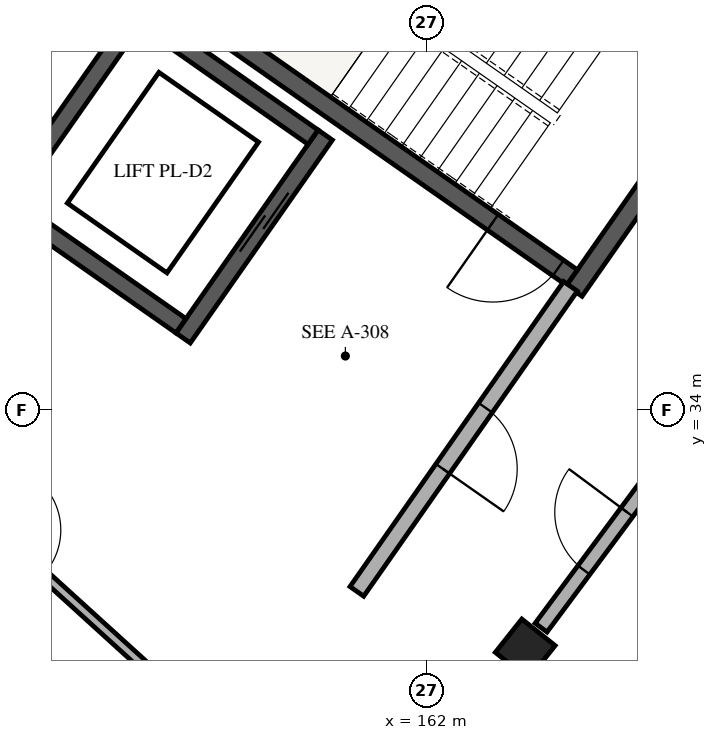
"""IFC4 building model, lengths in metres.
Left out: names, types, materials, properties, quantities, classifications, styles, units other than length and angle.
Written with IfcOpenShell. Run it as: python <this file> out.ifc"""

import sys

from ifc_helpers import new_model, si_unit, direction, frame, frame_2d, origin, origin_2d, place, context, subcontext, project, spatial, rectangle, extrude, element, fill, save


model = new_model("IFC4")
c1 = context("Model", 3, precision=1e-05, world=origin(), true_north=direction((0.0, 1.0)))
c2 = subcontext(c1, "Body", "Model", "MODEL_VIEW")
j1 = project(units=[si_unit("LENGTHUNIT", "METRE"), si_unit("PLANEANGLEUNIT", "RADIAN")], contexts=[c1])
p1 = place(None, origin())
s1 = spatial("IfcSite", under=j1, at=p1, CompositionType="ELEMENT")
p2 = place(p1, origin())
s2 = spatial("IfcBuilding", under=s1, at=p2, CompositionType="ELEMENT")
p3 = place(p2, frame((0.0, 0.0, 18.92)))
s3 = spatial("IfcBuildingStorey", under=s2, at=p3, CompositionType="ELEMENT", Elevation=18.92)
p4 = place(p3, frame((165.733, 38.336, 0.0), z_axis=(0.0, 0.0, 1.0), x_axis=(-0.819153711596, 0.573574055182, 0.0)))
e1 = element("IfcWall", 1, at=p4, inside=s3, PredefinedType="SHEAR", context=c2, shape_type="SweptSolid", body=[
    extrude(rectangle(XDim=6.6, YDim=0.25, at=frame_2d((3.3, 0.0))), origin(), (0.0, 0.0, 1.0), 3.11),
])
p5 = place(p3, frame((165.907, 38.366, 0.0), z_axis=(0.0, 0.0, 1.0), x_axis=(-0.573582112484, -0.819148069789, 0.0)))
e2 = element("IfcWall", 2, at=p5, inside=s3, PredefinedType="SHEAR", context=c2, shape_type="SweptSolid", body=[
    extrude(rectangle(XDim=3.42, YDim=0.25, at=frame_2d((1.71, 0.0))), origin(), (0.0, 0.0, 1.0), 3.11),
])
p6 = place(p3, frame((163.914, 35.739, 0.0), z_axis=(0.0, 0.0, 1.0), x_axis=(-0.819153711596, 0.573574055182, 0.0)))
e3 = element("IfcWall", 3, at=p6, inside=s3, PredefinedType="SHEAR", context=c2, shape_type="SweptSolid", body=[
    extrude(rectangle(XDim=6.6, YDim=0.25, at=frame_2d((3.3, 0.0))), origin(), (0.0, 0.0, 1.0), 3.11),
])
p7 = place(p6, frame((0.22, 0.0, 0.0)))
e4 = element("IfcOpeningElement", 4, at=p7, cuts=e3, PredefinedType="OPENING", context=c2, shape_type="SweptSolid", body=[
    extrude(rectangle(XDim=1.05, YDim=2.15, at=frame_2d((0.525, 1.075))), frame((0.0, 0.135, 0.0), z_axis=(0.0, -1.0, 0.0), x_axis=(1.0, 0.0, 0.0)), (0.0, 0.0, 1.0), 0.27),
])
p8 = place(p3, frame((160.668, 37.615, 0.0), z_axis=(0.0, 0.0, 1.0), x_axis=(-0.573582966431, -0.819147471839, 0.0)))
e5 = element("IfcWall", 5, at=p8, inside=s3, PredefinedType="SHEAR", context=c2, shape_type="SweptSolid", body=[
    extrude(rectangle(XDim=3.26, YDim=0.23, at=frame_2d((1.63, 0.0))), origin(), (0.0, 0.0, 1.0), 3.11),
])
p9 = place(p8, frame((0.9, 0.0, 0.0)))
e6 = element("IfcOpeningElement", 6, at=p9, cuts=e5, PredefinedType="OPENING", context=c2, shape_type="SweptSolid", body=[
    extrude(rectangle(XDim=1.0, YDim=2.15, at=frame_2d((0.5, 1.075))), frame((0.0, 0.125, 0.0), z_axis=(0.0, -1.0, 0.0), x_axis=(1.0, 0.0, 0.0)), (0.0, 0.0, 1.0), 0.25),
])
p10 = place(p3, frame((158.268, 39.296, 0.0), z_axis=(0.0, 0.0, 1.0), x_axis=(-0.573582966431, -0.819147471839, 0.0)))
e7 = element("IfcWall", 7, at=p10, inside=s3, PredefinedType="SHEAR", context=c2, shape_type="SweptSolid", body=[
    extrude(rectangle(XDim=3.26, YDim=0.23, at=frame_2d((1.63, 0.0))), origin(), (0.0, 0.0, 1.0), 3.11),
])
p11 = place(p3, frame((160.508, 37.587, 0.0), z_axis=(0.0, 0.0, 1.0), x_axis=(-0.819189439894, 0.573523026186, 0.0)))
e8 = element("IfcWall", 8, at=p11, inside=s3, PredefinedType="SHEAR", context=c2, shape_type="SweptSolid", body=[
    extrude(rectangle(XDim=2.7, YDim=0.23, at=frame_2d((1.35, 0.0))), origin(), (0.0, 0.0, 1.0), 3.11),
])
p12 = place(p3, frame((158.77, 35.105, 0.0), z_axis=(0.0, 0.0, 1.0), x_axis=(-0.819117209968, 0.573626181702, 0.0)))
e9 = element("IfcWall", 9, at=p12, inside=s3, PredefinedType="SHEAR", context=c2, shape_type="SweptSolid", body=[
    extrude(rectangle(XDim=2.7, YDim=0.23, at=frame_2d((1.35, 0.0))), origin(), (0.0, 0.0, 1.0), 3.11),
])
p13 = place(p3, frame((163.3, 30.853, 0.0), z_axis=(0.0, 0.0, 1.0), x_axis=(0.782608156852, -0.622514636638, 0.0)))
e10 = element("IfcColumn", 10, at=p13, inside=s3, PredefinedType="COLUMN", context=c2, shape_type="SweptSolid", body=[
    extrude(rectangle(XDim=0.56, YDim=0.56, at=origin_2d()), origin(), (0.0, 0.0, 1.0), 3.11),
])
p14 = place(p3, frame((163.895, 35.624, 0.0), z_axis=(0.0, 0.0, 1.0), x_axis=(-0.573572687386, -0.819154669329, 0.0)))
e11 = element("IfcWall", 11, at=p14, inside=s3, PredefinedType="PARTITIONING", context=c2, shape_type="SweptSolid", body=[
    extrude(rectangle(XDim=4.9, YDim=0.22, at=frame_2d((2.45, 0.0))), origin(), (0.0, 0.0, 1.0), 2.34),
])
p15 = place(p14, frame((1.95, 0.0, 0.0)))
e12 = element("IfcOpeningElement", 12, at=p15, cuts=e11, PredefinedType="OPENING", context=c2, shape_type="SweptSolid", body=[
    extrude(rectangle(XDim=0.98, YDim=2.14, at=frame_2d((0.49, 1.07))), frame((0.0, 0.12, 0.0), z_axis=(0.0, -1.0, 0.0), x_axis=(1.0, 0.0, 0.0)), (0.0, 0.0, 1.0), 0.24),
])
p16 = place(p3, frame((154.199, 34.344, 0.0), z_axis=(0.0, 0.0, 1.0), x_axis=(0.74023124711, -0.672352363573, 0.0)))
e13 = element("IfcWall", 13, at=p16, inside=s3, PredefinedType="PARTITIONING", context=c2, shape_type="SweptSolid", body=[
    extrude(rectangle(XDim=6.6, YDim=0.125, at=frame_2d((3.3, 0.0))), origin(), (0.0, 0.0, 1.0), 2.37),
])
p17 = place(p16, frame((2.865, 0.0, 0.0)))
e14 = element("IfcOpeningElement", 14, at=p17, cuts=e13, PredefinedType="OPENING", context=c2, shape_type="SweptSolid", body=[
    extrude(rectangle(XDim=0.87, YDim=2.08, at=frame_2d((0.435, 1.04))), frame((0.0, 0.073, 0.0), z_axis=(0.0, -1.0, 0.0), x_axis=(1.0, 0.0, 0.0)), (0.0, 0.0, 1.0), 0.145),
])
p18 = place(p3, frame((163.509, 31.134, 0.0), z_axis=(0.0, 0.0, 1.0), x_axis=(0.596552136601, 0.802574325727, 0.0)))
e15 = element("IfcWall", 15, at=p18, inside=s3, PredefinedType="PARTITIONING", context=c2, shape_type="SweptSolid", body=[
    extrude(rectangle(XDim=2.837, YDim=0.195, at=frame_2d((1.418, 0.0))), origin(), (0.0, 0.0, 1.0), 2.37),
])
p19 = place(p18, frame((0.944, 0.0, 0.0)))
e16 = element("IfcOpeningElement", 16, at=p19, cuts=e15, PredefinedType="OPENING", context=c2, shape_type="SweptSolid", body=[
    extrude(rectangle(XDim=0.95, YDim=2.13, at=frame_2d((0.475, 1.065))), frame((0.0, 0.107, 0.0), z_axis=(0.0, -1.0, 0.0), x_axis=(1.0, 0.0, 0.0)), (0.0, 0.0, 1.0), 0.215),
])
p20 = place(p7, origin())
e17 = element("IfcDoor", 17, at=p20, inside=s3, OperationType="SINGLE_SWING_RIGHT", PredefinedType="DOOR", context=c2, shape_type="SweptSolid", body=[
    extrude(rectangle(XDim=1.05, YDim=2.15, at=frame_2d((0.525, 1.075))), frame((0.0, 0.025, 0.0), z_axis=(0.0, -1.0, 0.0), x_axis=(1.0, 0.0, 0.0)), (0.0, 0.0, 1.0), 0.05),
])
fill(e4, e17)
p21 = place(p9, origin())
e18 = element("IfcDoor", 18, at=p21, inside=s3, OperationType="DOUBLE_DOOR_SLIDING", PredefinedType="DOOR", context=c2, shape_type="SweptSolid", body=[
    extrude(rectangle(XDim=1.0, YDim=2.15, at=frame_2d((0.5, 1.075))), frame((0.0, 0.025, 0.0), z_axis=(0.0, -1.0, 0.0), x_axis=(1.0, 0.0, 0.0)), (0.0, 0.0, 1.0), 0.05),
])
fill(e6, e18)
p22 = place(p15, origin())
e19 = element("IfcDoor", 19, at=p22, inside=s3, OperationType="SINGLE_SWING_RIGHT", PredefinedType="DOOR", context=c2, shape_type="SweptSolid", body=[
    extrude(rectangle(XDim=0.98, YDim=2.14, at=frame_2d((0.49, 1.07))), frame((0.0, 0.025, 0.0), z_axis=(0.0, -1.0, 0.0), x_axis=(1.0, 0.0, 0.0)), (0.0, 0.0, 1.0), 0.05),
])
fill(e12, e19)
p23 = place(p19, origin())
e20 = element("IfcDoor", 20, at=p23, inside=s3, OperationType="SINGLE_SWING_RIGHT", PredefinedType="DOOR", context=c2, shape_type="SweptSolid", body=[
    extrude(rectangle(XDim=0.95, YDim=2.13, at=frame_2d((0.475, 1.065))), frame((0.0, 0.025, 0.0), z_axis=(0.0, -1.0, 0.0), x_axis=(1.0, 0.0, 0.0)), (0.0, 0.0, 1.0), 0.05),
])
fill(e16, e20)
save(model, sys.argv[1])
